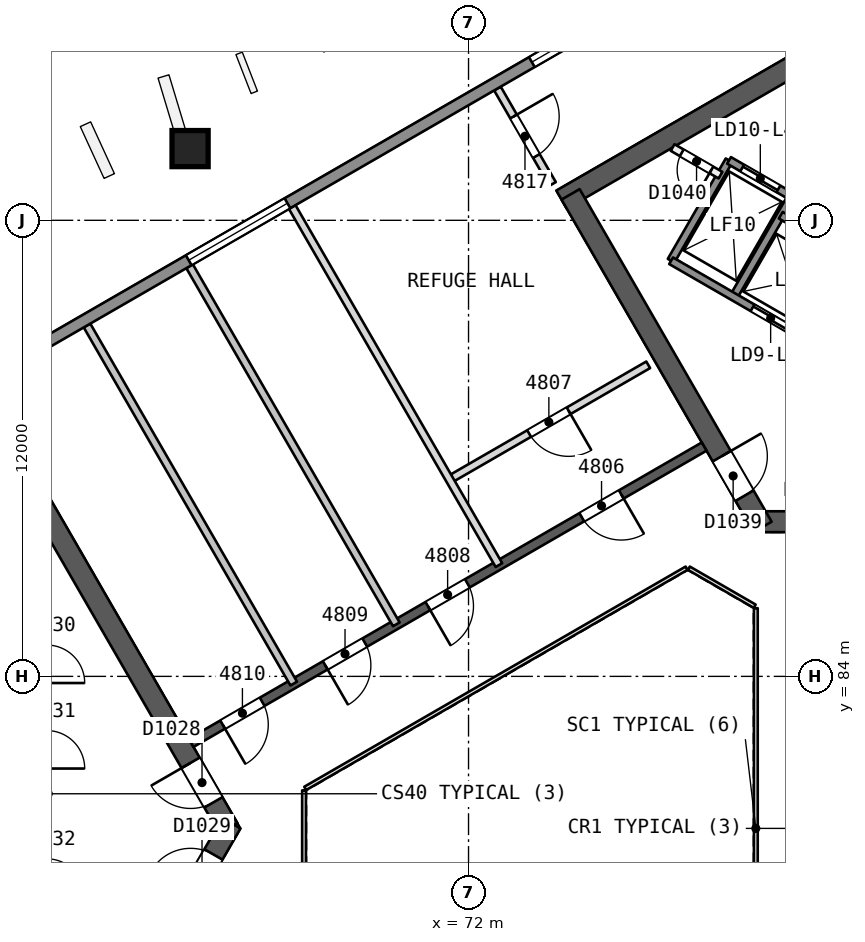
"""IFC4 building model, lengths in metres.
Left out: names, types, materials, properties, quantities, classifications, styles, units other than length and angle.
Written with IfcOpenShell. Run it as: python <this file> out.ifc"""

import sys

from ifc_helpers import new_model, si_unit, direction, frame, frame_2d, origin, origin_2d, place, context, subcontext, project, spatial, rectangle, extrude, element, fill, save


model = new_model("IFC4")
c1 = context("Model", 3, precision=1e-05, world=origin(), true_north=direction((0.0, 1.0)))
c2 = subcontext(c1, "Body", "Model", "MODEL_VIEW")
j1 = project(units=[si_unit("LENGTHUNIT", "METRE"), si_unit("PLANEANGLEUNIT", "RADIAN")], contexts=[c1])
p1 = place(None, origin())
s1 = spatial("IfcSite", under=j1, at=p1, CompositionType="ELEMENT")
p2 = place(p1, origin())
s2 = spatial("IfcBuilding", under=s1, at=p2, CompositionType="ELEMENT")
p3 = place(p2, frame((0.0, 0.0, 197.0)))
s3 = spatial("IfcBuildingStorey", under=s2, at=p3, CompositionType="ELEMENT", Elevation=197.0)
p4 = place(p3, frame((65.682, 80.0, 0.0), z_axis=(0.0, 0.0, 1.0), x_axis=(-0.500000202252, 0.866025287014, 0.0)))
e1 = element("IfcWall", 1, at=p4, inside=s3, PredefinedType="SHEAR", context=c2, shape_type="SweptSolid", body=[
    extrude(rectangle(XDim=10.221, YDim=0.55, at=frame_2d((5.111, 0.0))), origin(), (0.0, 0.0, 1.0), 4.4),
])
p5 = place(p4, frame((0.791, 0.0, 0.0)))
e2 = element("IfcOpeningElement", 2, at=p5, cuts=e1, PredefinedType="OPENING", context=c2, shape_type="SweptSolid", body=[
    extrude(rectangle(XDim=1.2, YDim=2.1, at=frame_2d((0.6, 1.05))), frame((0.0, 0.286, 0.0), z_axis=(0.0, -1.0, 0.0), x_axis=(1.0, 0.0, 0.0)), (0.0, 0.0, 1.0), 0.571),
])
p6 = place(p3, frame((60.709, 71.386, 0.0), z_axis=(0.0, 0.0, 1.0), x_axis=(0.500015938302, 0.866016201606, 0.0)))
e3 = element("IfcWall", 3, at=p6, inside=s3, PredefinedType="SHEAR", context=c2, shape_type="SweptSolid", body=[
    extrude(rectangle(XDim=10.105, YDim=0.55, at=frame_2d((5.053, 0.0))), origin(), (0.0, 0.0, 1.0), 4.4),
])
p7 = place(p6, frame((7.955, 0.0, 0.0)))
e4 = element("IfcOpeningElement", 4, at=p7, cuts=e3, PredefinedType="OPENING", context=c2, shape_type="SweptSolid", body=[
    extrude(rectangle(XDim=1.2, YDim=2.1, at=frame_2d((0.6, 1.05))), frame((0.0, 0.286, 0.0), z_axis=(0.0, -1.0, 0.0), x_axis=(1.0, 0.0, 0.0)), (0.0, 0.0, 1.0), 0.571),
])
p8 = place(p3, frame((79.659, 88.069, 0.0), z_axis=(0.0, 0.0, 1.0), x_axis=(1.0, 0.0, 0.0)))
e5 = element("IfcWall", 5, at=p8, inside=s3, PredefinedType="SHEAR", context=c2, shape_type="SweptSolid", body=[
    extrude(rectangle(XDim=10.221, YDim=0.55, at=frame_2d((5.111, 0.0))), origin(), (0.0, 0.0, 1.0), 4.4),
])
p9 = place(p8, frame((0.791, 0.0, 0.0)))
e6 = element("IfcOpeningElement", 6, at=p9, cuts=e5, PredefinedType="OPENING", context=c2, shape_type="SweptSolid", body=[
    extrude(rectangle(XDim=1.2, YDim=2.1, at=frame_2d((0.6, 1.05))), frame((0.0, 0.286, 0.0), z_axis=(0.0, -1.0, 0.0), x_axis=(1.0, 0.0, 0.0)), (0.0, 0.0, 1.0), 0.571),
])
p10 = place(p3, frame((86.723, 103.633, 0.0), z_axis=(0.0, 0.0, 1.0), x_axis=(-0.866023530946, -0.500003243837, 0.0)))
e7 = element("IfcWall", 7, at=p10, inside=s3, PredefinedType="SHEAR", context=c2, shape_type="SweptSolid", body=[
    extrude(rectangle(XDim=14.175, YDim=0.55, at=frame_2d((7.087, 0.0))), origin(), (0.0, 0.0, 1.0), 4.4),
])
p11 = place(p3, frame((74.686, 96.683, 0.0), z_axis=(0.0, 0.0, 1.0), x_axis=(0.499997818338, -0.866026663364, 0.0)))
e8 = element("IfcWall", 8, at=p11, inside=s3, PredefinedType="SHEAR", context=c2, shape_type="SweptSolid", body=[
    extrude(rectangle(XDim=10.105, YDim=0.55, at=frame_2d((5.052, 0.0))), origin(), (0.0, 0.0, 1.0), 4.4),
])
p12 = place(p11, frame((7.955, 0.0, 0.0)))
e9 = element("IfcOpeningElement", 9, at=p12, cuts=e8, PredefinedType="OPENING", context=c2, shape_type="SweptSolid", body=[
    extrude(rectangle(XDim=1.2, YDim=2.1, at=frame_2d((0.6, 1.05))), frame((0.0, 0.286, 0.0), z_axis=(0.0, -1.0, 0.0), x_axis=(1.0, 0.0, 0.0)), (0.0, 0.0, 1.0), 0.571),
])
p13 = place(p3, frame((78.2, 90.046, 0.0), z_axis=(0.0, 0.0, 1.0), x_axis=(-0.866026492143, -0.499998114903, 0.0)))
e10 = element("IfcWall", 10, at=p13, inside=s3, PredefinedType="SHEAR", context=c2, shape_type="SweptSolid", body=[
    extrude(rectangle(XDim=15.588, YDim=0.25, at=frame_2d((7.794, 0.0))), origin(), (0.0, 0.0, 1.0), 3.95),
])
p14 = place(p13, frame((2.518, 0.0, 0.0)))
e11 = element("IfcOpeningElement", 11, at=p14, cuts=e10, PredefinedType="OPENING", context=c2, shape_type="SweptSolid", body=[
    extrude(rectangle(XDim=1.2, YDim=2.4, at=frame_2d((0.6, 1.2))), frame((0.0, 0.135, 0.0), z_axis=(0.0, -1.0, 0.0), x_axis=(1.0, 0.0, 0.0)), (0.0, 0.0, 1.0), 0.271),
])
p15 = place(p13, frame((7.194, 0.0, 0.0)))
e12 = element("IfcOpeningElement", 12, at=p15, cuts=e10, PredefinedType="OPENING", context=c2, shape_type="SweptSolid", body=[
    extrude(rectangle(XDim=1.2, YDim=2.4, at=frame_2d((0.6, 1.2))), frame((0.0, 0.135, 0.0), z_axis=(0.0, -1.0, 0.0), x_axis=(1.0, 0.0, 0.0)), (0.0, 0.0, 1.0), 0.271),
])
p16 = place(p13, frame((10.312, 0.0, 0.0)))
e13 = element("IfcOpeningElement", 13, at=p16, cuts=e10, PredefinedType="OPENING", context=c2, shape_type="SweptSolid", body=[
    extrude(rectangle(XDim=1.2, YDim=2.4, at=frame_2d((0.6, 1.2))), frame((0.0, 0.135, 0.0), z_axis=(0.0, -1.0, 0.0), x_axis=(1.0, 0.0, 0.0)), (0.0, 0.0, 1.0), 0.271),
])
p17 = place(p13, frame((13.43, 0.0, 0.0)))
e14 = element("IfcOpeningElement", 14, at=p17, cuts=e10, PredefinedType="OPENING", context=c2, shape_type="SweptSolid", body=[
    extrude(rectangle(XDim=1.2, YDim=2.4, at=frame_2d((0.6, 1.2))), frame((0.0, 0.135, 0.0), z_axis=(0.0, -1.0, 0.0), x_axis=(1.0, 0.0, 0.0)), (0.0, 0.0, 1.0), 0.271),
])
p18 = place(p3, frame((64.661, 97.908, 0.0), z_axis=(0.010041240412, -0.017475086904, 0.999796876785), x_axis=(-0.498107573272, 0.866880983918, 0.020154532277)))
e15 = element("IfcColumn", 15, at=p18, inside=s3, PredefinedType="COLUMN", context=c2, shape_type="SweptSolid", body=[
    extrude(rectangle(XDim=0.95, YDim=0.95, at=origin_2d()), origin(), (0.0, 0.0, 1.0), 4.401),
])
p19 = place(p3, frame((76.728, 92.198, 0.0), z_axis=(0.0, 0.0, 1.0), x_axis=(-0.866029326177, -0.499993206155, 0.0)))
e16 = element("IfcWall", 16, at=p19, inside=s3, PredefinedType="PARTITIONING", context=c2, shape_type="SweptSolid", body=[
    extrude(rectangle(XDim=6.036, YDim=0.2, at=frame_2d((3.018, 0.0))), origin(), (0.0, 0.0, 1.0), 3.95),
])
p20 = place(p19, frame((2.418, 0.0, 0.0)))
e17 = element("IfcOpeningElement", 17, at=p20, cuts=e16, PredefinedType="OPENING", context=c2, shape_type="SweptSolid", body=[
    extrude(rectangle(XDim=1.2, YDim=2.4, at=frame_2d((0.6, 1.2))), frame((0.0, 0.11, 0.0), z_axis=(0.0, -1.0, 0.0), x_axis=(1.0, 0.0, 0.0)), (0.0, 0.0, 1.0), 0.221),
])
p21 = place(p3, frame((67.36, 96.35, 0.0), z_axis=(0.0, 0.0, 1.0), x_axis=(0.49999829022, -0.866026390924, 0.0)))
e18 = element("IfcWall", 18, at=p21, inside=s3, PredefinedType="PARTITIONING", context=c2, shape_type="SweptSolid", body=[
    extrude(rectangle(XDim=10.879, YDim=0.2, at=frame_2d((5.44, 0.0))), origin(), (0.0, 0.0, 1.0), 3.95),
])
p22 = place(p3, frame((72.76, 99.468, 0.0), z_axis=(0.0, 0.0, 1.0), x_axis=(0.499977468037, -0.866038412228, 0.0)))
e19 = element("IfcWall", 19, at=p22, inside=s3, PredefinedType="PARTITIONING", context=c2, shape_type="SweptSolid", body=[
    extrude(rectangle(XDim=2.901, YDim=0.2, at=frame_2d((1.45, 0.0))), origin(), (0.0, 0.0, 1.0), 3.95),
])
p23 = place(p22, frame((0.85, 0.0, 0.0)))
e20 = element("IfcOpeningElement", 20, at=p23, cuts=e19, PredefinedType="OPENING", context=c2, shape_type="SweptSolid", body=[
    extrude(rectangle(XDim=1.2, YDim=2.4, at=frame_2d((0.6, 1.2))), frame((0.0, 0.11, 0.0), z_axis=(0.0, -1.0, 0.0), x_axis=(1.0, 0.0, 0.0)), (0.0, 0.0, 1.0), 0.221),
])
p24 = place(p3, frame((64.66, 94.791, 0.0), z_axis=(0.0, 0.0, 1.0), x_axis=(0.500015120401, -0.866016673841, 0.0)))
e21 = element("IfcWall", 21, at=p24, inside=s3, PredefinedType="PARTITIONING", context=c2, shape_type="SweptSolid", body=[
    extrude(rectangle(XDim=10.88, YDim=0.2, at=frame_2d((5.44, 0.0))), origin(), (0.0, 0.0, 1.0), 3.95),
])
p25 = place(p3, frame((61.96, 93.232, 0.0), z_axis=(0.0, 0.0, 1.0), x_axis=(0.49999829022, -0.866026390924, 0.0)))
e22 = element("IfcWall", 22, at=p25, inside=s3, PredefinedType="PARTITIONING", context=c2, shape_type="SweptSolid", body=[
    extrude(rectangle(XDim=10.879, YDim=0.2, at=frame_2d((5.44, 0.0))), origin(), (0.0, 0.0, 1.0), 3.95),
])
p26 = place(p3, frame((43.362, 82.667, 0.0), z_axis=(0.0, 0.0, 1.0), x_axis=(0.866025243948, 0.500000276845, 0.0)))
e23 = element("IfcWall", 23, at=p26, inside=s3, PredefinedType="SOLIDWALL", context=c2, shape_type="SweptSolid", body=[
    extrude(rectangle(XDim=52.132, YDim=0.3, at=frame_2d((26.066, 0.0))), origin(), (0.0, 0.0, 1.0), 3.95),
])
p27 = place(p26, frame((8.193, 0.0, 0.9)))
e24 = element("IfcOpeningElement", 24, at=p27, cuts=e23, PredefinedType="OPENING", context=c2, shape_type="SweptSolid", body=[
    extrude(rectangle(XDim=1.8, YDim=1.5, at=frame_2d((0.9, 0.75))), frame((0.0, 0.161, 0.0), z_axis=(0.0, -1.0, 0.0), x_axis=(1.0, 0.0, 0.0)), (0.0, 0.0, 1.0), 0.321),
])
p28 = place(p26, frame((42.139, 0.0, 0.9)))
e25 = element("IfcOpeningElement", 25, at=p28, cuts=e23, PredefinedType="OPENING", context=c2, shape_type="SweptSolid", body=[
    extrude(rectangle(XDim=1.8, YDim=1.5, at=frame_2d((0.9, 0.75))), frame((0.0, 0.161, 0.0), z_axis=(0.0, -1.0, 0.0), x_axis=(1.0, 0.0, 0.0)), (0.0, 0.0, 1.0), 0.321),
])
p29 = place(p26, frame((3.713, 0.0, 0.6)))
e26 = element("IfcOpeningElement", 26, at=p29, cuts=e23, PredefinedType="OPENING", context=c2, shape_type="SweptSolid", body=[
    extrude(rectangle(XDim=3.0, YDim=2.4, at=frame_2d((1.5, 1.2))), frame((0.0, 0.161, 0.0), z_axis=(0.0, -1.0, 0.0), x_axis=(1.0, 0.0, 0.0)), (0.0, 0.0, 1.0), 0.321),
])
p30 = place(p26, frame((14.14, 0.0, 0.6)))
e27 = element("IfcOpeningElement", 27, at=p30, cuts=e23, PredefinedType="OPENING", context=c2, shape_type="SweptSolid", body=[
    extrude(rectangle(XDim=3.0, YDim=2.4, at=frame_2d((1.5, 1.2))), frame((0.0, 0.161, 0.0), z_axis=(0.0, -1.0, 0.0), x_axis=(1.0, 0.0, 0.0)), (0.0, 0.0, 1.0), 0.321),
])
p31 = place(p26, frame((24.566, 0.0, 0.6)))
e28 = element("IfcOpeningElement", 28, at=p31, cuts=e23, PredefinedType="OPENING", context=c2, shape_type="SweptSolid", body=[
    extrude(rectangle(XDim=3.0, YDim=2.4, at=frame_2d((1.5, 1.2))), frame((0.0, 0.161, 0.0), z_axis=(0.0, -1.0, 0.0), x_axis=(1.0, 0.0, 0.0)), (0.0, 0.0, 1.0), 0.321),
])
p32 = place(p26, frame((34.992, 0.0, 0.6)))
e29 = element("IfcOpeningElement", 29, at=p32, cuts=e23, PredefinedType="OPENING", context=c2, shape_type="SweptSolid", body=[
    extrude(rectangle(XDim=3.0, YDim=2.4, at=frame_2d((1.5, 1.2))), frame((0.0, 0.161, 0.0), z_axis=(0.0, -1.0, 0.0), x_axis=(1.0, 0.0, 0.0)), (0.0, 0.0, 1.0), 0.321),
])
p33 = place(p26, frame((45.419, 0.0, 0.6)))
e30 = element("IfcOpeningElement", 30, at=p33, cuts=e23, PredefinedType="OPENING", context=c2, shape_type="SweptSolid", body=[
    extrude(rectangle(XDim=3.0, YDim=2.4, at=frame_2d((1.5, 1.2))), frame((0.0, 0.161, 0.0), z_axis=(0.0, -1.0, 0.0), x_axis=(1.0, 0.0, 0.0)), (0.0, 0.0, 1.0), 0.321),
])
for number, where, z_axis, x_axis in (
    (31, (78.976, 93.986, 0.0), (0.0, 0.0, 1.0), (0.5, 0.866, 0.0)),
    (32, (77.33, 94.936, 0.0), (0.0, 0.0, 1.0), (0.5, 0.866, 0.0)),
):
    element("IfcWall", number, at=place(p3, frame(where, z_axis=z_axis, x_axis=x_axis)), inside=s3, PredefinedType="SOLIDWALL", context=c2, shape_type="SweptSolid", body=[
        extrude(rectangle(XDim=3.05, YDim=0.2, at=frame_2d((1.525, 0.0))), origin(), (0.0, 0.0, 1.0), 3.95),
    ])
p34 = place(p3, frame((86.77, 89.486, 0.0), z_axis=(0.0, 0.0, 1.0), x_axis=(-0.86601811187, 0.500012629753, 0.0)))
e33 = element("IfcWall", 33, at=p34, inside=s3, PredefinedType="SOLIDWALL", context=c2, shape_type="SweptSolid", body=[
    extrude(rectangle(XDim=10.9, YDim=0.2, at=frame_2d((5.45, 0.0))), origin(), (0.0, 0.0, 1.0), 3.95),
])
p35 = place(p34, frame((0.575, 0.0, 0.0)))
e34 = element("IfcOpeningElement", 34, at=p35, cuts=e33, PredefinedType="OPENING", context=c2, shape_type="SweptSolid", body=[
    extrude(rectangle(XDim=1.1, YDim=2.1, at=frame_2d((0.55, 1.05))), frame((0.0, 0.11, 0.0), z_axis=(0.0, -1.0, 0.0), x_axis=(1.0, 0.0, 0.0)), (0.0, 0.0, 1.0), 0.221),
])
p36 = place(p34, frame((2.825, 0.0, 0.0)))
e35 = element("IfcOpeningElement", 35, at=p36, cuts=e33, PredefinedType="OPENING", context=c2, shape_type="SweptSolid", body=[
    extrude(rectangle(XDim=1.1, YDim=2.1, at=frame_2d((0.55, 1.05))), frame((0.0, 0.11, 0.0), z_axis=(0.0, -1.0, 0.0), x_axis=(1.0, 0.0, 0.0)), (0.0, 0.0, 1.0), 0.221),
])
p37 = place(p34, frame((5.075, 0.0, 0.0)))
e36 = element("IfcOpeningElement", 36, at=p37, cuts=e33, PredefinedType="OPENING", context=c2, shape_type="SweptSolid", body=[
    extrude(rectangle(XDim=1.1, YDim=2.1, at=frame_2d((0.55, 1.05))), frame((0.0, 0.11, 0.0), z_axis=(0.0, -1.0, 0.0), x_axis=(1.0, 0.0, 0.0)), (0.0, 0.0, 1.0), 0.221),
])
p38 = place(p34, frame((7.325, 0.0, 0.0)))
e37 = element("IfcOpeningElement", 37, at=p38, cuts=e33, PredefinedType="OPENING", context=c2, shape_type="SweptSolid", body=[
    extrude(rectangle(XDim=1.1, YDim=2.1, at=frame_2d((0.55, 1.05))), frame((0.0, 0.11, 0.0), z_axis=(0.0, -1.0, 0.0), x_axis=(1.0, 0.0, 0.0)), (0.0, 0.0, 1.0), 0.221),
])
p39 = place(p3, frame((89.33, 90.872, 0.0), z_axis=(0.0, 0.0, 1.0), x_axis=(-0.866027589512, 0.49999621419, 0.0)))
e38 = element("IfcWall", 38, at=p39, inside=s3, PredefinedType="SOLIDWALL", context=c2, shape_type="SweptSolid", body=[
    extrude(rectangle(XDim=10.524, YDim=0.2, at=frame_2d((5.262, 0.0))), origin(), (0.0, 0.0, 1.0), 3.95),
])
p40 = place(p39, frame((0.312, 0.0, 0.0)))
e39 = element("IfcOpeningElement", 39, at=p40, cuts=e38, PredefinedType="OPENING", context=c2, shape_type="SweptSolid", body=[
    extrude(rectangle(XDim=0.9, YDim=2.1, at=frame_2d((0.45, 1.05))), frame((0.0, 0.11, 0.0), z_axis=(0.0, -1.0, 0.0), x_axis=(1.0, 0.0, 0.0)), (0.0, 0.0, 1.0), 0.221),
])
p41 = place(p3, frame((78.63, 97.188, 0.0), z_axis=(0.0, 0.0, 1.0), x_axis=(-0.866003949776, 0.500037157592, 0.0)))
e40 = element("IfcWall", 40, at=p41, inside=s3, PredefinedType="PARTITIONING", context=c2, shape_type="SweptSolid", body=[
    extrude(rectangle(XDim=1.455, YDim=0.2, at=frame_2d((0.728, 0.0))), origin(), (0.0, 0.0, 1.0), 3.95),
])
p42 = place(p41, frame((0.278, 0.0, 0.0)))
e41 = element("IfcOpeningElement", 41, at=p42, cuts=e40, PredefinedType="OPENING", context=c2, shape_type="SweptSolid", body=[
    extrude(rectangle(XDim=0.9, YDim=2.1, at=frame_2d((0.45, 1.05))), frame((0.0, 0.11, 0.0), z_axis=(0.0, -1.0, 0.0), x_axis=(1.0, 0.0, 0.0)), (0.0, 0.0, 1.0), 0.221),
])
p43 = place(p3, frame((80.5, 96.627, 0.0), z_axis=(0.0, 0.0, 1.0), x_axis=(-0.86601224135, 0.500022797313, 0.0)))
e42 = element("IfcWall", 42, at=p43, inside=s3, PredefinedType="SOLIDWALL", context=c2, shape_type="SweptSolid", body=[
    extrude(rectangle(XDim=1.9, YDim=0.2, at=frame_2d((0.95, 0.0))), origin(), (0.0, 0.0, 1.0), 3.95),
])
p44 = place(p43, frame((0.4, 0.0, 0.0)))
e43 = element("IfcOpeningElement", 43, at=p44, cuts=e42, PredefinedType="OPENING", context=c2, shape_type="SweptSolid", body=[
    extrude(rectangle(XDim=1.1, YDim=2.1, at=frame_2d((0.55, 1.05))), frame((0.0, 0.11, 0.0), z_axis=(0.0, -1.0, 0.0), x_axis=(1.0, 0.0, 0.0)), (0.0, 0.0, 1.0), 0.221),
])
p45 = place(p3, frame((79.56, 74.206, 0.0), z_axis=(0.0, 0.0, 1.0), x_axis=(0.0, 1.0, 0.0)))
e44 = element("IfcWall", 44, at=p45, inside=s3, PredefinedType="PARTITIONING", context=c2, shape_type="SweptSolid", body=[
    extrude(rectangle(XDim=11.588, YDim=0.1, at=frame_2d((5.794, 0.0))), origin(), (0.0, 0.0, 1.0), 3.95),
])
p46 = place(p3, frame((79.53, 85.846, 0.0), z_axis=(0.0, 0.0, 1.0), x_axis=(-0.866041268327, 0.499972520799, 0.0)))
e45 = element("IfcWall", 45, at=p46, inside=s3, PredefinedType="PARTITIONING", context=c2, shape_type="SweptSolid", body=[
    extrude(rectangle(XDim=2.0, YDim=0.1, at=frame_2d((1.0, 0.0))), origin(), (0.0, 0.0, 1.0), 3.95),
])
p47 = place(p3, frame((77.738, 86.846, 0.0), z_axis=(0.0, 0.0, 1.0), x_axis=(-0.866026658274, -0.499997827154, 0.0)))
e46 = element("IfcWall", 46, at=p47, inside=s3, PredefinedType="PARTITIONING", context=c2, shape_type="SweptSolid", body=[
    extrude(rectangle(XDim=11.588, YDim=0.1, at=frame_2d((5.794, 0.0))), origin(), (0.0, 0.0, 1.0), 3.95),
])
p48 = place(p3, frame((67.672, 81.0, 0.0), z_axis=(0.0, 0.0, 1.0), x_axis=(0.0, -1.0, 0.0)))
e47 = element("IfcWall", 47, at=p48, inside=s3, PredefinedType="PARTITIONING", context=c2, shape_type="SweptSolid", body=[
    extrude(rectangle(XDim=2.0, YDim=0.1, at=frame_2d((1.0, 0.0))), origin(), (0.0, 0.0, 1.0), 3.95),
])
p49 = place(p14, origin())
e48 = element("IfcDoor", 48, at=p49, inside=s3, OperationType="SINGLE_SWING_LEFT", PredefinedType="NOTDEFINED", context=c2, shape_type="SweptSolid", body=[
    extrude(rectangle(XDim=1.2, YDim=2.4, at=frame_2d((0.6, 1.2))), frame((0.0, 0.025, 0.0), z_axis=(0.0, -1.0, 0.0), x_axis=(1.0, 0.0, 0.0)), (0.0, 0.0, 1.0), 0.05),
])
fill(e11, e48)
p50 = place(p20, origin())
e49 = element("IfcDoor", 49, at=p50, inside=s3, OperationType="SINGLE_SWING_LEFT", PredefinedType="NOTDEFINED", context=c2, shape_type="SweptSolid", body=[
    extrude(rectangle(XDim=1.2, YDim=2.4, at=frame_2d((0.6, 1.2))), frame((0.0, 0.025, 0.0), z_axis=(0.0, -1.0, 0.0), x_axis=(1.0, 0.0, 0.0)), (0.0, 0.0, 1.0), 0.05),
])
fill(e17, e49)
p51 = place(p15, origin())
e50 = element("IfcDoor", 50, at=p51, inside=s3, OperationType="SINGLE_SWING_RIGHT", PredefinedType="NOTDEFINED", context=c2, shape_type="SweptSolid", body=[
    extrude(rectangle(XDim=1.2, YDim=2.4, at=frame_2d((0.6, 1.2))), frame((0.0, 0.025, 0.0), z_axis=(0.0, -1.0, 0.0), x_axis=(1.0, 0.0, 0.0)), (0.0, 0.0, 1.0), 0.05),
])
fill(e12, e50)
p52 = place(p16, origin())
e51 = element("IfcDoor", 51, at=p52, inside=s3, OperationType="SINGLE_SWING_RIGHT", PredefinedType="NOTDEFINED", context=c2, shape_type="SweptSolid", body=[
    extrude(rectangle(XDim=1.2, YDim=2.4, at=frame_2d((0.6, 1.2))), frame((0.0, 0.025, 0.0), z_axis=(0.0, -1.0, 0.0), x_axis=(1.0, 0.0, 0.0)), (0.0, 0.0, 1.0), 0.05),
])
fill(e13, e51)
p53 = place(p17, origin())
e52 = element("IfcDoor", 52, at=p53, inside=s3, OperationType="SINGLE_SWING_RIGHT", PredefinedType="NOTDEFINED", context=c2, shape_type="SweptSolid", body=[
    extrude(rectangle(XDim=1.2, YDim=2.4, at=frame_2d((0.6, 1.2))), frame((0.0, 0.025, 0.0), z_axis=(0.0, -1.0, 0.0), x_axis=(1.0, 0.0, 0.0)), (0.0, 0.0, 1.0), 0.05),
])
fill(e14, e52)
p54 = place(p23, origin())
e53 = element("IfcDoor", 53, at=p54, inside=s3, OperationType="SINGLE_SWING_LEFT", PredefinedType="NOTDEFINED", context=c2, shape_type="SweptSolid", body=[
    extrude(rectangle(XDim=1.2, YDim=2.4, at=frame_2d((0.6, 1.2))), frame((0.0, 0.025, 0.0), z_axis=(0.0, -1.0, 0.0), x_axis=(1.0, 0.0, 0.0)), (0.0, 0.0, 1.0), 0.05),
])
fill(e20, e53)
p55 = place(p31, origin())
e54 = element("IfcWindow", 54, at=p55, inside=s3, PartitioningType="SINGLE_PANEL", PredefinedType="WINDOW", context=c2, shape_type="SweptSolid", body=[
    extrude(rectangle(XDim=3.0, YDim=2.4, at=frame_2d((1.5, 1.2))), frame((0.0, 0.03, 0.0), z_axis=(0.0, -1.0, 0.0), x_axis=(1.0, 0.0, 0.0)), (0.0, 0.0, 1.0), 0.06),
])
fill(e28, e54)
p56 = place(p32, origin())
e55 = element("IfcWindow", 55, at=p56, inside=s3, PartitioningType="SINGLE_PANEL", PredefinedType="WINDOW", context=c2, shape_type="SweptSolid", body=[
    extrude(rectangle(XDim=3.0, YDim=2.4, at=frame_2d((1.5, 1.2))), frame((0.0, 0.03, 0.0), z_axis=(0.0, -1.0, 0.0), x_axis=(1.0, 0.0, 0.0)), (0.0, 0.0, 1.0), 0.06),
])
fill(e29, e55)
p57 = place(p5, origin())
e56 = element("IfcDoor", 56, at=p57, inside=s3, OperationType="SINGLE_SWING_RIGHT", PredefinedType="NOTDEFINED", context=c2, shape_type="SweptSolid", body=[
    extrude(rectangle(XDim=1.2, YDim=2.1, at=frame_2d((0.6, 1.05))), frame((0.0, 0.025, 0.0), z_axis=(0.0, -1.0, 0.0), x_axis=(1.0, 0.0, 0.0)), (0.0, 0.0, 1.0), 0.05),
])
fill(e2, e56)
p58 = place(p7, origin())
e57 = element("IfcDoor", 57, at=p58, inside=s3, OperationType="SINGLE_SWING_LEFT", PredefinedType="NOTDEFINED", context=c2, shape_type="SweptSolid", body=[
    extrude(rectangle(XDim=1.2, YDim=2.1, at=frame_2d((0.6, 1.05))), frame((0.0, 0.025, 0.0), z_axis=(0.0, -1.0, 0.0), x_axis=(1.0, 0.0, 0.0)), (0.0, 0.0, 1.0), 0.05),
])
fill(e4, e57)
p59 = place(p12, origin())
e58 = element("IfcDoor", 58, at=p59, inside=s3, OperationType="SINGLE_SWING_LEFT", PredefinedType="NOTDEFINED", context=c2, shape_type="SweptSolid", body=[
    extrude(rectangle(XDim=1.2, YDim=2.1, at=frame_2d((0.6, 1.05))), frame((0.0, 0.025, 0.0), z_axis=(0.0, -1.0, 0.0), x_axis=(1.0, 0.0, 0.0)), (0.0, 0.0, 1.0), 0.05),
])
fill(e9, e58)
p60 = place(p38, origin())
e59 = element("IfcDoor", 59, at=p60, inside=s3, OperationType="SLIDING_TO_LEFT", PredefinedType="NOTDEFINED", context=c2, shape_type="SweptSolid", body=[
    extrude(rectangle(XDim=1.1, YDim=2.1, at=frame_2d((0.55, 1.05))), frame((0.0, 0.025, 0.0), z_axis=(0.0, -1.0, 0.0), x_axis=(1.0, 0.0, 0.0)), (0.0, 0.0, 1.0), 0.05),
])
fill(e37, e59)
p61 = place(p44, origin())
e60 = element("IfcDoor", 60, at=p61, inside=s3, OperationType="SLIDING_TO_RIGHT", PredefinedType="NOTDEFINED", context=c2, shape_type="SweptSolid", body=[
    extrude(rectangle(XDim=1.1, YDim=2.1, at=frame_2d((0.55, 1.05))), frame((0.0, 0.025, 0.0), z_axis=(0.0, -1.0, 0.0), x_axis=(1.0, 0.0, 0.0)), (0.0, 0.0, 1.0), 0.05),
])
fill(e43, e60)
p62 = place(p42, origin())
e61 = element("IfcDoor", 61, at=p62, inside=s3, OperationType="SINGLE_SWING_LEFT", PredefinedType="NOTDEFINED", context=c2, shape_type="SweptSolid", body=[
    extrude(rectangle(XDim=0.9, YDim=2.1, at=frame_2d((0.45, 1.05))), frame((0.0, 0.025, 0.0), z_axis=(0.0, -1.0, 0.0), x_axis=(1.0, 0.0, 0.0)), (0.0, 0.0, 1.0), 0.05),
])
fill(e41, e61)
save(model, sys.argv[1])
